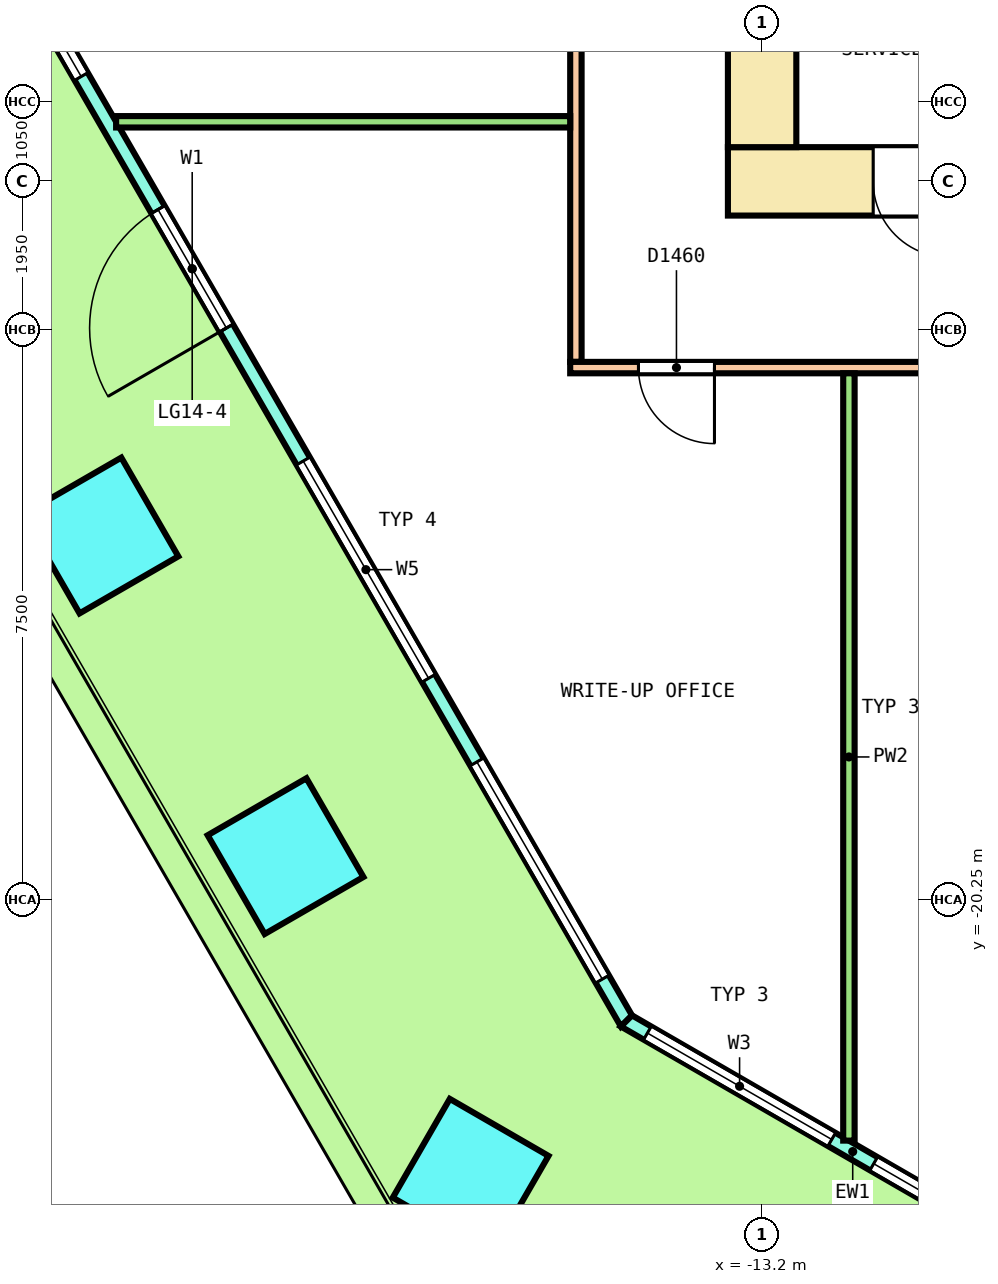
"""IFC4 building model, lengths in metres.
Left out: names, types, materials, properties, quantities, classifications, styles, units other than length and angle.
Written with IfcOpenShell. Run it as: python <this file> out.ifc"""

import sys

from ifc_helpers import new_model, si_unit, direction, frame, frame_2d, origin, origin_2d, place, context, subcontext, project, spatial, polyline, rectangle, outline, extrude, element, fill, save


model = new_model("IFC4")
c1 = context("Model", 3, precision=1e-05, world=origin(), true_north=direction((0.0, 1.0)))
c2 = subcontext(c1, "Body", "Model", "MODEL_VIEW")
j1 = project(units=[si_unit("LENGTHUNIT", "METRE"), si_unit("PLANEANGLEUNIT", "RADIAN")], contexts=[c1])
p1 = place(None, origin())
s1 = spatial("IfcSite", under=j1, at=p1, CompositionType="ELEMENT")
p2 = place(p1, origin())
s2 = spatial("IfcBuilding", under=s1, at=p2, CompositionType="ELEMENT")
p3 = place(p2, frame((0.0, 0.0, 63.0)))
s3 = spatial("IfcBuildingStorey", under=s2, at=p3, CompositionType="ELEMENT", Elevation=63.0)
p4 = place(p3, frame((-21.905, -15.459, 0.0), z_axis=(0.0, 0.0, 1.0), x_axis=(0.5, -0.866025403784, 0.0)))
e1 = element("IfcColumn", 1, at=p4, inside=s3, PredefinedType="COLUMN", context=c2, shape_type="SweptSolid", body=[
    extrude(rectangle(XDim=1.5, YDim=1.5, at=origin_2d()), origin(), (0.0, 0.0, 1.0), 4.05),
])
for number, where, z_axis, x_axis in (
    (2, (-19.47, -19.677, 0.0), (0.0, 0.0, 1.0), (0.5, -0.866, 0.0)),
    (3, (-17.035, -23.895, 0.0), (0.0, 0.0, 1.0), (0.866, -0.5, 0.0)),
):
    element("IfcColumn", number, at=place(p3, frame(where, z_axis=z_axis, x_axis=x_axis)), inside=s3, PredefinedType="COLUMN", context=c2, shape_type="SweptSolid", body=[
        extrude(rectangle(XDim=1.5, YDim=1.5, at=origin_2d()), origin(), (0.0, 0.0, 1.0), 4.04),
    ])
p5 = place(p3, frame((-26.411, -2.055, 0.0), z_axis=(0.0, 0.0, 1.0), x_axis=(0.50000204422, -0.86602422355, 0.0)))
e4 = element("IfcWall", 4, at=p5, inside=s3, PredefinedType="SOLIDWALL", context=c2, shape_type="SweptSolid", body=[
    extrude(outline(polyline([(-0.027, -0.1), (1.014, -0.1), (2.055, -0.1), (3.097, -0.1), (4.138, -0.1), (5.179, -0.1), (6.22, -0.1), (7.261, -0.1), (8.303, -0.1), (9.344, -0.1), (10.385, -0.1), (11.426, -0.1), (12.468, -0.1), (13.509, -0.1), (14.55, -0.1), (15.591, -0.1), (16.632, -0.1), (17.673, -0.1), (18.715, -0.1), (19.756, -0.1), (20.797, -0.1), (21.838, -0.1), (22.879, -0.1), (22.826, 0.1), (21.789, 0.1), (20.753, 0.1), (19.717, 0.1), (18.68, 0.1), (17.644, 0.1), (16.608, 0.1), (15.572, 0.1), (14.535, 0.1), (13.499, 0.1), (12.463, 0.1), (11.426, 0.1), (10.39, 0.1), (9.354, 0.1), (8.317, 0.1), (7.281, 0.1), (6.245, 0.1), (5.208, 0.1), (4.172, 0.1), (3.136, 0.1), (2.099, 0.1), (1.063, 0.1), (0.027, 0.1), (-0.027, -0.1)])), origin(), (0.0, 0.0, 1.0), 4.1),
])
p6 = place(p5, frame((0.635, 0.0, 0.1)))
e5 = element("IfcOpeningElement", 5, at=p6, cuts=e4, PredefinedType="OPENING", context=c2, shape_type="SweptSolid", body=[
    extrude(rectangle(XDim=3.3, YDim=2.9, at=frame_2d((1.65, 1.45))), frame((0.0, 0.11, 0.0), z_axis=(0.0, -1.0, 0.0), x_axis=(1.0, 0.0, 0.0)), (0.0, 0.0, 1.0), 0.22),
])
p7 = place(p5, frame((5.206, 0.0, 0.1)))
e6 = element("IfcOpeningElement", 6, at=p7, cuts=e4, PredefinedType="OPENING", context=c2, shape_type="SweptSolid", body=[
    extrude(rectangle(XDim=3.3, YDim=2.9, at=frame_2d((1.65, 1.45))), frame((0.0, 0.11, 0.0), z_axis=(0.0, -1.0, 0.0), x_axis=(1.0, 0.0, 0.0)), (0.0, 0.0, 1.0), 0.22),
])
p8 = place(p5, frame((10.526, 0.0, 0.0)))
e7 = element("IfcOpeningElement", 7, at=p8, cuts=e4, PredefinedType="OPENING", context=c2, shape_type="SweptSolid", body=[
    extrude(rectangle(XDim=1.8, YDim=2.4, at=frame_2d((0.9, 1.2))), frame((0.0, 0.11, 0.0), z_axis=(0.0, -1.0, 0.0), x_axis=(1.0, 0.0, 0.0)), (0.0, 0.0, 1.0), 0.22),
])
p9 = place(p5, frame((10.526, 0.0, 2.55)))
e8 = element("IfcOpeningElement", 8, at=p9, cuts=e4, PredefinedType="OPENING", context=c2, shape_type="SweptSolid", body=[
    extrude(rectangle(XDim=1.8, YDim=0.45, at=frame_2d((0.9, 0.225))), frame((0.0, 0.11, 0.0), z_axis=(0.0, -1.0, 0.0), x_axis=(1.0, 0.0, 0.0)), (0.0, 0.0, 1.0), 0.22),
])
p10 = place(p5, frame((14.347, 0.0, 0.1)))
e9 = element("IfcOpeningElement", 9, at=p10, cuts=e4, PredefinedType="OPENING", context=c2, shape_type="SweptSolid", body=[
    extrude(rectangle(XDim=3.3, YDim=2.9, at=frame_2d((1.65, 1.45))), frame((0.0, 0.11, 0.0), z_axis=(0.0, -1.0, 0.0), x_axis=(1.0, 0.0, 0.0)), (0.0, 0.0, 1.0), 0.22),
])
p11 = place(p5, frame((18.917, 0.0, 0.1)))
e10 = element("IfcOpeningElement", 10, at=p11, cuts=e4, PredefinedType="OPENING", context=c2, shape_type="SweptSolid", body=[
    extrude(rectangle(XDim=3.3, YDim=2.9, at=frame_2d((1.65, 1.45))), frame((0.0, 0.11, 0.0), z_axis=(0.0, -1.0, 0.0), x_axis=(1.0, 0.0, 0.0)), (0.0, 0.0, 1.0), 0.22),
])
p12 = place(p3, frame((-14.985, -21.845, 0.0), z_axis=(0.0, 0.0, 1.0), x_axis=(0.866029458321, -0.49999297727, 0.0)))
e11 = element("IfcWall", 11, at=p12, inside=s3, PredefinedType="SOLIDWALL", context=c2, shape_type="SweptSolid", body=[
    extrude(outline(polyline([(-0.027, -0.1), (1.128, -0.1), (2.282, -0.1), (3.437, -0.1), (4.592, -0.1), (5.747, -0.1), (6.901, -0.1), (6.848, 0.1), (5.711, 0.1), (4.574, 0.1), (3.437, 0.1), (2.301, 0.1), (1.164, 0.1), (0.027, 0.1), (-0.027, -0.1)])), origin(), (0.0, 0.0, 1.0), 4.1),
])
p13 = place(p12, frame((0.319, 0.0, 0.1)))
e12 = element("IfcOpeningElement", 12, at=p13, cuts=e11, PredefinedType="OPENING", context=c2, shape_type="SweptSolid", body=[
    extrude(rectangle(XDim=2.8, YDim=2.9, at=frame_2d((1.4, 1.45))), frame((0.0, 0.11, 0.0), z_axis=(0.0, -1.0, 0.0), x_axis=(1.0, 0.0, 0.0)), (0.0, 0.0, 1.0), 0.22),
])
p14 = place(p12, frame((3.756, 0.0, 0.1)))
e13 = element("IfcOpeningElement", 13, at=p14, cuts=e11, PredefinedType="OPENING", context=c2, shape_type="SweptSolid", body=[
    extrude(rectangle(XDim=2.8, YDim=2.9, at=frame_2d((1.4, 1.45))), frame((0.0, 0.11, 0.0), z_axis=(0.0, -1.0, 0.0), x_axis=(1.0, 0.0, 0.0)), (0.0, 0.0, 1.0), 0.22),
])
p15 = place(p3, frame((-13.65, -10.8, 0.0), z_axis=(0.0, 0.0, 1.0), x_axis=(1.0, 0.0, 0.0)))
e14 = element("IfcWall", 14, at=p15, inside=s3, PredefinedType="SHEAR", context=c2, shape_type="SweptSolid", body=[
    extrude(rectangle(XDim=27.3, YDim=0.9, at=frame_2d((13.65, 0.0))), origin(), (0.0, 0.0, 1.0), 4.1),
])
p16 = place(p15, frame((1.911, 0.0, 0.0)))
e15 = element("IfcOpeningElement", 15, at=p16, cuts=e14, PredefinedType="OPENING", context=c2, shape_type="SweptSolid", body=[
    extrude(rectangle(XDim=1.0, YDim=2.1, at=frame_2d((0.5, 1.05))), frame((0.0, 0.46, 0.0), z_axis=(0.0, -1.0, 0.0), x_axis=(1.0, 0.0, 0.0)), (0.0, 0.0, 1.0), 0.92),
])
p17 = place(p15, frame((5.027, 0.0, 0.0)))
e16 = element("IfcOpeningElement", 16, at=p17, cuts=e14, PredefinedType="OPENING", context=c2, shape_type="SweptSolid", body=[
    extrude(rectangle(XDim=1.0, YDim=2.1, at=frame_2d((0.5, 1.05))), frame((0.0, 0.46, 0.0), z_axis=(0.0, -1.0, 0.0), x_axis=(1.0, 0.0, 0.0)), (0.0, 0.0, 1.0), 0.92),
])
p18 = place(p15, frame((8.111, 0.0, 0.0)))
e17 = element("IfcOpeningElement", 17, at=p18, cuts=e14, PredefinedType="OPENING", context=c2, shape_type="SweptSolid", body=[
    extrude(rectangle(XDim=1.0, YDim=2.1, at=frame_2d((0.5, 1.05))), frame((0.0, 0.46, 0.0), z_axis=(0.0, -1.0, 0.0), x_axis=(1.0, 0.0, 0.0)), (0.0, 0.0, 1.0), 0.92),
])
p19 = place(p15, frame((11.195, 0.0, 0.0)))
e18 = element("IfcOpeningElement", 18, at=p19, cuts=e14, PredefinedType="OPENING", context=c2, shape_type="SweptSolid", body=[
    extrude(rectangle(XDim=1.0, YDim=2.1, at=frame_2d((0.5, 1.05))), frame((0.0, 0.46, 0.0), z_axis=(0.0, -1.0, 0.0), x_axis=(1.0, 0.0, 0.0)), (0.0, 0.0, 1.0), 0.92),
])
p20 = place(p15, frame((19.202, 0.0, 0.0)))
e19 = element("IfcOpeningElement", 19, at=p20, cuts=e14, PredefinedType="OPENING", context=c2, shape_type="SweptSolid", body=[
    extrude(rectangle(XDim=1.0, YDim=2.1, at=frame_2d((0.5, 1.05))), frame((0.0, 0.46, 0.0), z_axis=(0.0, -1.0, 0.0), x_axis=(1.0, 0.0, 0.0)), (0.0, 0.0, 1.0), 0.92),
])
p21 = place(p15, frame((21.881, 0.0, 0.0)))
e20 = element("IfcOpeningElement", 20, at=p21, cuts=e14, PredefinedType="OPENING", context=c2, shape_type="SweptSolid", body=[
    extrude(rectangle(XDim=1.0, YDim=2.1, at=frame_2d((0.5, 1.05))), frame((0.0, 0.46, 0.0), z_axis=(0.0, -1.0, 0.0), x_axis=(1.0, 0.0, 0.0)), (0.0, 0.0, 1.0), 0.92),
])
p22 = place(p15, frame((24.592, 0.0, 0.0)))
e21 = element("IfcOpeningElement", 21, at=p22, cuts=e14, PredefinedType="OPENING", context=c2, shape_type="SweptSolid", body=[
    extrude(rectangle(XDim=1.0, YDim=2.1, at=frame_2d((0.5, 1.05))), frame((0.0, 0.46, 0.0), z_axis=(0.0, -1.0, 0.0), x_axis=(1.0, 0.0, 0.0)), (0.0, 0.0, 1.0), 0.92),
])
p23 = place(p15, frame((15.2, 0.0, 0.0)))
e22 = element("IfcOpeningElement", 22, at=p23, cuts=e14, PredefinedType="OPENING", context=c2, shape_type="SweptSolid", body=[
    extrude(rectangle(XDim=1.2, YDim=2.1, at=frame_2d((0.6, 1.05))), frame((0.0, 0.46, 0.0), z_axis=(0.0, -1.0, 0.0), x_axis=(1.0, 0.0, 0.0)), (0.0, 0.0, 1.0), 0.92),
])
p24 = place(p3, frame((-13.2, -10.35, 0.0), z_axis=(0.0, 0.0, 1.0), x_axis=(0.0, 1.0, 0.0)))
e23 = element("IfcWall", 23, at=p24, inside=s3, PredefinedType="SHEAR", context=c2, shape_type="SweptSolid", body=[
    extrude(rectangle(XDim=20.7, YDim=0.9, at=frame_2d((10.35, 0.0))), origin(), (0.0, 0.0, 1.0), 4.1),
])
p25 = place(p24, frame((9.15, 0.0, 0.0)))
e24 = element("IfcOpeningElement", 24, at=p25, cuts=e23, PredefinedType="OPENING", context=c2, shape_type="SweptSolid", body=[
    extrude(rectangle(XDim=2.4, YDim=2.1, at=frame_2d((1.2, 1.05))), frame((0.0, 0.46, 0.0), z_axis=(0.0, -1.0, 0.0), x_axis=(1.0, 0.0, 0.0)), (0.0, 0.0, 1.0), 0.92),
])
p26 = place(p24, frame((16.05, 0.0, 0.0)))
e25 = element("IfcOpeningElement", 25, at=p26, cuts=e23, PredefinedType="OPENING", context=c2, shape_type="SweptSolid", body=[
    extrude(rectangle(XDim=1.2, YDim=2.1, at=frame_2d((0.6, 1.05))), frame((0.0, 0.46, 0.0), z_axis=(0.0, -1.0, 0.0), x_axis=(1.0, 0.0, 0.0)), (0.0, 0.0, 1.0), 0.92),
])
p27 = place(p24, frame((3.45, 0.0, 0.0)))
e26 = element("IfcOpeningElement", 26, at=p27, cuts=e23, PredefinedType="OPENING", context=c2, shape_type="SweptSolid", body=[
    extrude(rectangle(XDim=1.2, YDim=2.1, at=frame_2d((0.6, 1.05))), frame((0.0, 0.46, 0.0), z_axis=(0.0, -1.0, 0.0), x_axis=(1.0, 0.0, 0.0)), (0.0, 0.0, 1.0), 0.92),
])
p28 = place(p3, frame((-15.65, -13.175, 0.0), z_axis=(0.0, 0.0, 1.0), x_axis=(0.0, 1.0, 0.0)))
e27 = element("IfcWall", 27, at=p28, inside=s3, PredefinedType="PARTITIONING", context=c2, shape_type="SweptSolid", body=[
    extrude(rectangle(XDim=26.35, YDim=0.15, at=frame_2d((13.175, 0.0))), origin(), (0.0, 0.0, 1.0), 3.05),
])
p29 = place(p28, frame((24.797, 0.0, 0.0)))
e28 = element("IfcOpeningElement", 28, at=p29, cuts=e27, PredefinedType="OPENING", context=c2, shape_type="SweptSolid", body=[
    extrude(rectangle(XDim=1.0, YDim=2.1, at=frame_2d((0.5, 1.05))), frame((0.0, 0.085, 0.0), z_axis=(0.0, -1.0, 0.0), x_axis=(1.0, 0.0, 0.0)), (0.0, 0.0, 1.0), 0.17),
])
p30 = place(p28, frame((21.346, 0.0, 0.0)))
e29 = element("IfcOpeningElement", 29, at=p30, cuts=e27, PredefinedType="OPENING", context=c2, shape_type="SweptSolid", body=[
    extrude(rectangle(XDim=1.0, YDim=2.1, at=frame_2d((0.5, 1.05))), frame((0.0, 0.085, 0.0), z_axis=(0.0, -1.0, 0.0), x_axis=(1.0, 0.0, 0.0)), (0.0, 0.0, 1.0), 0.17),
])
p31 = place(p28, frame((8.046, 0.0, 0.0)))
e30 = element("IfcOpeningElement", 30, at=p31, cuts=e27, PredefinedType="OPENING", context=c2, shape_type="SweptSolid", body=[
    extrude(rectangle(XDim=1.2, YDim=2.1, at=frame_2d((0.6, 1.05))), frame((0.0, 0.085, 0.0), z_axis=(0.0, -1.0, 0.0), x_axis=(1.0, 0.0, 0.0)), (0.0, 0.0, 1.0), 0.17),
])
p32 = place(p3, frame((-15.725, -13.25, 0.0), z_axis=(0.0, 0.0, 1.0), x_axis=(1.0, 0.0, 0.0)))
e31 = element("IfcWall", 31, at=p32, inside=s3, PredefinedType="PARTITIONING", context=c2, shape_type="SweptSolid", body=[
    extrude(rectangle(XDim=31.325, YDim=0.15, at=frame_2d((15.663, 0.0))), origin(), (0.0, 0.0, 1.0), 3.05),
])
p33 = place(p32, frame((0.898, 0.0, 0.0)))
e32 = element("IfcOpeningElement", 32, at=p33, cuts=e31, PredefinedType="OPENING", context=c2, shape_type="SweptSolid", body=[
    extrude(rectangle(XDim=1.0, YDim=2.1, at=frame_2d((0.5, 1.05))), frame((0.0, 0.085, 0.0), z_axis=(0.0, -1.0, 0.0), x_axis=(1.0, 0.0, 0.0)), (0.0, 0.0, 1.0), 0.17),
])
p34 = place(p32, frame((5.198, 0.0, 0.0)))
e33 = element("IfcOpeningElement", 33, at=p34, cuts=e31, PredefinedType="OPENING", context=c2, shape_type="SweptSolid", body=[
    extrude(rectangle(XDim=1.2, YDim=2.1, at=frame_2d((0.6, 1.05))), frame((0.0, 0.085, 0.0), z_axis=(0.0, -1.0, 0.0), x_axis=(1.0, 0.0, 0.0)), (0.0, 0.0, 1.0), 0.17),
])
p35 = place(p32, frame((14.115, 0.0, 0.0)))
e34 = element("IfcOpeningElement", 34, at=p35, cuts=e31, PredefinedType="OPENING", context=c2, shape_type="SweptSolid", body=[
    extrude(rectangle(XDim=1.2, YDim=2.1, at=frame_2d((0.6, 1.05))), frame((0.0, 0.085, 0.0), z_axis=(0.0, -1.0, 0.0), x_axis=(1.0, 0.0, 0.0)), (0.0, 0.0, 1.0), 0.17),
])
p36 = place(p32, frame((22.046, 0.0, 0.0)))
e35 = element("IfcOpeningElement", 35, at=p36, cuts=e31, PredefinedType="OPENING", context=c2, shape_type="SweptSolid", body=[
    extrude(rectangle(XDim=1.0, YDim=2.1, at=frame_2d((0.5, 1.05))), frame((0.0, 0.085, 0.0), z_axis=(0.0, -1.0, 0.0), x_axis=(1.0, 0.0, 0.0)), (0.0, 0.0, 1.0), 0.17),
])
p37 = place(p32, frame((28.358, 0.0, 0.0)))
e36 = element("IfcOpeningElement", 36, at=p37, cuts=e31, PredefinedType="OPENING", context=c2, shape_type="SweptSolid", body=[
    extrude(rectangle(XDim=1.0, YDim=2.1, at=frame_2d((0.5, 1.05))), frame((0.0, 0.085, 0.0), z_axis=(0.0, -1.0, 0.0), x_axis=(1.0, 0.0, 0.0)), (0.0, 0.0, 1.0), 0.17),
])
p38 = place(p3, frame((-21.699, -10.016, 0.0), z_axis=(0.0, 0.0, 1.0), x_axis=(1.0, 0.0, 0.0)))
e37 = element("IfcWall", 37, at=p38, inside=s3, PredefinedType="PARTITIONING", context=c2, shape_type="SweptSolid", body=[
    extrude(rectangle(XDim=5.974, YDim=0.15, at=frame_2d((2.987, 0.0))), origin(), (0.0, 0.0, 1.0), 3.05),
])
p39 = place(p3, frame((-12.058, -23.42, 0.0), z_axis=(0.0, 0.0, 1.0), x_axis=(0.0, 1.0, 0.0)))
e38 = element("IfcWall", 38, at=p39, inside=s3, PredefinedType="PARTITIONING", context=c2, shape_type="SweptSolid", body=[
    extrude(rectangle(XDim=10.095, YDim=0.15, at=frame_2d((5.047, 0.0))), origin(), (0.0, 0.0, 1.0), 3.05),
])
p40 = place(p7, origin())
e39 = element("IfcWindow", 39, at=p40, inside=s3, PartitioningType="SINGLE_PANEL", PredefinedType="WINDOW", context=c2, shape_type="SweptSolid", body=[
    extrude(rectangle(XDim=3.3, YDim=2.9, at=frame_2d((1.65, 1.45))), frame((0.0, 0.03, 0.0), z_axis=(0.0, -1.0, 0.0), x_axis=(1.0, 0.0, 0.0)), (0.0, 0.0, 1.0), 0.06),
])
fill(e6, e39)
p41 = place(p8, origin())
e40 = element("IfcDoor", 40, at=p41, inside=s3, OperationType="DOUBLE_DOOR_SINGLE_SWING", PredefinedType="DOOR", context=c2, shape_type="SweptSolid", body=[
    extrude(rectangle(XDim=1.8, YDim=2.4, at=frame_2d((0.9, 1.2))), frame((0.0, 0.025, 0.0), z_axis=(0.0, -1.0, 0.0), x_axis=(1.0, 0.0, 0.0)), (0.0, 0.0, 1.0), 0.05),
])
fill(e7, e40)
p42 = place(p9, origin())
e41 = element("IfcWindow", 41, at=p42, inside=s3, PartitioningType="SINGLE_PANEL", PredefinedType="WINDOW", context=c2, shape_type="SweptSolid", body=[
    extrude(rectangle(XDim=1.8, YDim=0.45, at=frame_2d((0.9, 0.225))), frame((0.0, 0.03, 0.0), z_axis=(0.0, -1.0, 0.0), x_axis=(1.0, 0.0, 0.0)), (0.0, 0.0, 1.0), 0.06),
])
fill(e8, e41)
p43 = place(p10, origin())
e42 = element("IfcWindow", 42, at=p43, inside=s3, PartitioningType="SINGLE_PANEL", PredefinedType="WINDOW", context=c2, shape_type="SweptSolid", body=[
    extrude(rectangle(XDim=3.3, YDim=2.9, at=frame_2d((1.65, 1.45))), frame((0.0, 0.03, 0.0), z_axis=(0.0, -1.0, 0.0), x_axis=(1.0, 0.0, 0.0)), (0.0, 0.0, 1.0), 0.06),
])
fill(e9, e42)
p44 = place(p11, origin())
e43 = element("IfcWindow", 43, at=p44, inside=s3, PartitioningType="SINGLE_PANEL", PredefinedType="WINDOW", context=c2, shape_type="SweptSolid", body=[
    extrude(rectangle(XDim=3.3, YDim=2.9, at=frame_2d((1.65, 1.45))), frame((0.0, 0.03, 0.0), z_axis=(0.0, -1.0, 0.0), x_axis=(1.0, 0.0, 0.0)), (0.0, 0.0, 1.0), 0.06),
])
fill(e10, e43)
p45 = place(p13, origin())
e44 = element("IfcWindow", 44, at=p45, inside=s3, PartitioningType="SINGLE_PANEL", PredefinedType="WINDOW", context=c2, shape_type="SweptSolid", body=[
    extrude(rectangle(XDim=2.8, YDim=2.9, at=frame_2d((1.4, 1.45))), frame((0.0, 0.03, 0.0), z_axis=(0.0, -1.0, 0.0), x_axis=(1.0, 0.0, 0.0)), (0.0, 0.0, 1.0), 0.06),
])
fill(e12, e44)
p46 = place(p14, origin())
e45 = element("IfcWindow", 45, at=p46, inside=s3, PartitioningType="SINGLE_PANEL", PredefinedType="WINDOW", context=c2, shape_type="SweptSolid", body=[
    extrude(rectangle(XDim=2.8, YDim=2.9, at=frame_2d((1.4, 1.45))), frame((0.0, 0.03, 0.0), z_axis=(0.0, -1.0, 0.0), x_axis=(1.0, 0.0, 0.0)), (0.0, 0.0, 1.0), 0.06),
])
fill(e13, e45)
p47 = place(p16, origin())
e46 = element("IfcDoor", 46, at=p47, inside=s3, OperationType="SINGLE_SWING_LEFT", PredefinedType="DOOR", context=c2, shape_type="SweptSolid", body=[
    extrude(rectangle(XDim=1.0, YDim=2.1, at=frame_2d((0.5, 1.05))), frame((0.0, 0.3, 0.0), z_axis=(0.0, -1.0, 0.0), x_axis=(1.0, 0.0, 0.0)), (0.0, 0.0, 1.0), 0.6),
])
fill(e15, e46)
p48 = place(p33, origin())
e47 = element("IfcDoor", 47, at=p48, inside=s3, OperationType="SINGLE_SWING_RIGHT", PredefinedType="DOOR", context=c2, shape_type="SweptSolid", body=[
    extrude(rectangle(XDim=1.0, YDim=2.1, at=frame_2d((0.5, 1.05))), frame((0.0, 0.025, 0.0), z_axis=(0.0, -1.0, 0.0), x_axis=(1.0, 0.0, 0.0)), (0.0, 0.0, 1.0), 0.05),
])
fill(e32, e47)
save(model, sys.argv[1])
